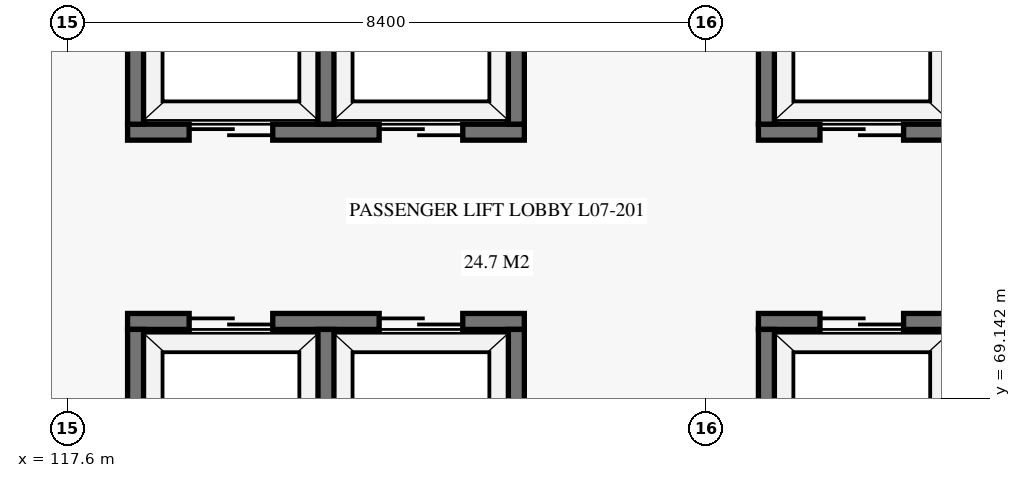
"""IFC4 building model, lengths in metres.
Left out: names, types, materials, properties, quantities, classifications, styles, units other than length and angle.
Written with IfcOpenShell. Run it as: python <this file> out.ifc"""

import sys

from ifc_helpers import new_model, si_unit, direction, frame, frame_2d, origin, place, context, subcontext, project, spatial, rectangle, extrude, element, fill, save


model = new_model("IFC4")
c1 = context("Model", 3, precision=1e-05, world=origin(), true_north=direction((0.0, 1.0)))
c2 = subcontext(c1, "Body", "Model", "MODEL_VIEW")
j1 = project(units=[si_unit("LENGTHUNIT", "METRE"), si_unit("PLANEANGLEUNIT", "RADIAN")], contexts=[c1])
p1 = place(None, origin())
s1 = spatial("IfcSite", under=j1, at=p1, CompositionType="ELEMENT")
p2 = place(p1, origin())
s2 = spatial("IfcBuilding", under=s1, at=p2, CompositionType="ELEMENT")
p3 = place(p2, frame((0.0, 0.0, 30.7)))
s3 = spatial("IfcBuildingStorey", under=s2, at=p3, CompositionType="ELEMENT", Elevation=30.7)
p4 = place(p3, frame((126.69, 70.155, 0.0), z_axis=(0.0, 0.0, 1.0), x_axis=(1.0, 0.0, 0.0)))
e1 = element("IfcWall", 1, at=p4, inside=s3, PredefinedType="SHEAR", context=c2, shape_type="SweptSolid", body=[
    extrude(rectangle(XDim=5.22, YDim=0.21, at=frame_2d((2.61, 0.0))), origin(), (0.0, 0.0, 1.0), 3.72),
])
p5 = place(p4, frame((0.81, 0.0, 0.0)))
e2 = element("IfcOpeningElement", 2, at=p5, cuts=e1, PredefinedType="OPENING", context=c2, shape_type="SweptSolid", body=[
    extrude(rectangle(XDim=1.1, YDim=2.15, at=frame_2d((0.55, 1.075))), frame((0.0, 0.115, 0.0), z_axis=(0.0, -1.0, 0.0), x_axis=(1.0, 0.0, 0.0)), (0.0, 0.0, 1.0), 0.23),
])
p6 = place(p4, frame((3.31, 0.0, 0.0)))
e3 = element("IfcOpeningElement", 3, at=p6, cuts=e1, PredefinedType="OPENING", context=c2, shape_type="SweptSolid", body=[
    extrude(rectangle(XDim=1.1, YDim=2.15, at=frame_2d((0.55, 1.075))), frame((0.0, 0.115, 0.0), z_axis=(0.0, -1.0, 0.0), x_axis=(1.0, 0.0, 0.0)), (0.0, 0.0, 1.0), 0.23),
])
p7 = place(p3, frame((126.795, 67.85, 0.0), z_axis=(0.0, 0.0, 1.0), x_axis=(0.0, 1.0, 0.0)))
e4 = element("IfcWall", 4, at=p7, inside=s3, PredefinedType="SHEAR", context=c2, shape_type="SweptSolid", body=[
    extrude(rectangle(XDim=2.2, YDim=0.21, at=frame_2d((1.1, 0.0))), origin(), (0.0, 0.0, 1.0), 3.72),
])
p8 = place(p3, frame((126.69, 72.645, 0.0), z_axis=(0.0, 0.0, 1.0), x_axis=(1.0, 0.0, 0.0)))
e5 = element("IfcWall", 5, at=p8, inside=s3, PredefinedType="SHEAR", context=c2, shape_type="SweptSolid", body=[
    extrude(rectangle(XDim=5.22, YDim=0.21, at=frame_2d((2.61, 0.0))), origin(), (0.0, 0.0, 1.0), 3.72),
])
p9 = place(p8, frame((0.81, 0.0, 0.0)))
e6 = element("IfcOpeningElement", 6, at=p9, cuts=e5, PredefinedType="OPENING", context=c2, shape_type="SweptSolid", body=[
    extrude(rectangle(XDim=1.1, YDim=2.15, at=frame_2d((0.55, 1.075))), frame((0.0, 0.115, 0.0), z_axis=(0.0, -1.0, 0.0), x_axis=(1.0, 0.0, 0.0)), (0.0, 0.0, 1.0), 0.23),
])
p10 = place(p8, frame((3.31, 0.0, 0.0)))
e7 = element("IfcOpeningElement", 7, at=p10, cuts=e5, PredefinedType="OPENING", context=c2, shape_type="SweptSolid", body=[
    extrude(rectangle(XDim=1.1, YDim=2.15, at=frame_2d((0.55, 1.075))), frame((0.0, 0.115, 0.0), z_axis=(0.0, -1.0, 0.0), x_axis=(1.0, 0.0, 0.0)), (0.0, 0.0, 1.0), 0.23),
])
p11 = place(p3, frame((126.795, 72.75, 0.0), z_axis=(0.0, 0.0, 1.0), x_axis=(0.0, 1.0, 0.0)))
e8 = element("IfcWall", 8, at=p11, inside=s3, PredefinedType="SHEAR", context=c2, shape_type="SweptSolid", body=[
    extrude(rectangle(XDim=2.2, YDim=0.21, at=frame_2d((1.1, 0.0))), origin(), (0.0, 0.0, 1.0), 3.72),
])
p12 = place(p3, frame((118.39, 70.155, 0.0), z_axis=(0.0, 0.0, 1.0), x_axis=(1.0, 0.0, 0.0)))
e9 = element("IfcWall", 9, at=p12, inside=s3, PredefinedType="SHEAR", context=c2, shape_type="SweptSolid", body=[
    extrude(rectangle(XDim=5.22, YDim=0.21, at=frame_2d((2.61, 0.0))), origin(), (0.0, 0.0, 1.0), 3.72),
])
p13 = place(p12, frame((0.81, 0.0, 0.0)))
e10 = element("IfcOpeningElement", 10, at=p13, cuts=e9, PredefinedType="OPENING", context=c2, shape_type="SweptSolid", body=[
    extrude(rectangle(XDim=1.1, YDim=2.15, at=frame_2d((0.55, 1.075))), frame((0.0, 0.115, 0.0), z_axis=(0.0, -1.0, 0.0), x_axis=(1.0, 0.0, 0.0)), (0.0, 0.0, 1.0), 0.23),
])
p14 = place(p12, frame((3.31, 0.0, 0.0)))
e11 = element("IfcOpeningElement", 11, at=p14, cuts=e9, PredefinedType="OPENING", context=c2, shape_type="SweptSolid", body=[
    extrude(rectangle(XDim=1.1, YDim=2.15, at=frame_2d((0.55, 1.075))), frame((0.0, 0.115, 0.0), z_axis=(0.0, -1.0, 0.0), x_axis=(1.0, 0.0, 0.0)), (0.0, 0.0, 1.0), 0.23),
])
for number, where, z_axis, x_axis in (
    (12, (118.495, 67.85, 0.0), (0.0, 0.0, 1.0), (0.0, 1.0, 0.0)),
    (13, (123.505, 67.85, 0.0), (0.0, 0.0, 1.0), (0.0, 1.0, 0.0)),
    (14, (121.0, 67.85, 0.0), (0.0, 0.0, 1.0), (0.0, 1.0, 0.0)),
):
    element("IfcWall", number, at=place(p3, frame(where, z_axis=z_axis, x_axis=x_axis)), inside=s3, PredefinedType="SHEAR", context=c2, shape_type="SweptSolid", body=[
        extrude(rectangle(XDim=2.2, YDim=0.21, at=frame_2d((1.1, 0.0))), origin(), (0.0, 0.0, 1.0), 3.72),
    ])
p15 = place(p3, frame((118.39, 72.645, 0.0), z_axis=(0.0, 0.0, 1.0), x_axis=(1.0, 0.0, 0.0)))
e15 = element("IfcWall", 15, at=p15, inside=s3, PredefinedType="SHEAR", context=c2, shape_type="SweptSolid", body=[
    extrude(rectangle(XDim=5.22, YDim=0.21, at=frame_2d((2.61, 0.0))), origin(), (0.0, 0.0, 1.0), 3.72),
])
p16 = place(p15, frame((0.81, 0.0, 0.0)))
e16 = element("IfcOpeningElement", 16, at=p16, cuts=e15, PredefinedType="OPENING", context=c2, shape_type="SweptSolid", body=[
    extrude(rectangle(XDim=1.1, YDim=2.15, at=frame_2d((0.55, 1.075))), frame((0.0, 0.115, 0.0), z_axis=(0.0, -1.0, 0.0), x_axis=(1.0, 0.0, 0.0)), (0.0, 0.0, 1.0), 0.23),
])
p17 = place(p15, frame((3.31, 0.0, 0.0)))
e17 = element("IfcOpeningElement", 17, at=p17, cuts=e15, PredefinedType="OPENING", context=c2, shape_type="SweptSolid", body=[
    extrude(rectangle(XDim=1.1, YDim=2.15, at=frame_2d((0.55, 1.075))), frame((0.0, 0.115, 0.0), z_axis=(0.0, -1.0, 0.0), x_axis=(1.0, 0.0, 0.0)), (0.0, 0.0, 1.0), 0.23),
])
for number, where, z_axis, x_axis in (
    (18, (118.495, 72.75, 0.0), (0.0, 0.0, 1.0), (0.0, 1.0, 0.0)),
    (19, (123.505, 72.75, 0.0), (0.0, 0.0, 1.0), (0.0, 1.0, 0.0)),
    (20, (121.0, 72.75, 0.0), (0.0, 0.0, 1.0), (0.0, 1.0, 0.0)),
):
    element("IfcWall", number, at=place(p3, frame(where, z_axis=z_axis, x_axis=x_axis)), inside=s3, PredefinedType="SHEAR", context=c2, shape_type="SweptSolid", body=[
        extrude(rectangle(XDim=2.2, YDim=0.21, at=frame_2d((1.1, 0.0))), origin(), (0.0, 0.0, 1.0), 3.72),
    ])
p18 = place(p5, origin())
e21 = element("IfcDoor", 21, at=p18, inside=s3, OperationType="DOUBLE_DOOR_SLIDING", PredefinedType="DOOR", context=c2, shape_type="SweptSolid", body=[
    extrude(rectangle(XDim=1.1, YDim=2.15, at=frame_2d((0.55, 1.075))), frame((0.0, 0.025, 0.0), z_axis=(0.0, -1.0, 0.0), x_axis=(1.0, 0.0, 0.0)), (0.0, 0.0, 1.0), 0.05),
])
fill(e2, e21)
p19 = place(p9, origin())
e22 = element("IfcDoor", 22, at=p19, inside=s3, OperationType="DOUBLE_DOOR_SLIDING", PredefinedType="DOOR", context=c2, shape_type="SweptSolid", body=[
    extrude(rectangle(XDim=1.1, YDim=2.15, at=frame_2d((0.55, 1.075))), frame((0.0, 0.025, 0.0), z_axis=(0.0, -1.0, 0.0), x_axis=(1.0, 0.0, 0.0)), (0.0, 0.0, 1.0), 0.05),
])
fill(e6, e22)
p20 = place(p13, origin())
e23 = element("IfcDoor", 23, at=p20, inside=s3, OperationType="DOUBLE_DOOR_SLIDING", PredefinedType="DOOR", context=c2, shape_type="SweptSolid", body=[
    extrude(rectangle(XDim=1.1, YDim=2.15, at=frame_2d((0.55, 1.075))), frame((0.0, 0.025, 0.0), z_axis=(0.0, -1.0, 0.0), x_axis=(1.0, 0.0, 0.0)), (0.0, 0.0, 1.0), 0.05),
])
fill(e10, e23)
p21 = place(p14, origin())
e24 = element("IfcDoor", 24, at=p21, inside=s3, OperationType="DOUBLE_DOOR_SLIDING", PredefinedType="DOOR", context=c2, shape_type="SweptSolid", body=[
    extrude(rectangle(XDim=1.1, YDim=2.15, at=frame_2d((0.55, 1.075))), frame((0.0, 0.025, 0.0), z_axis=(0.0, -1.0, 0.0), x_axis=(1.0, 0.0, 0.0)), (0.0, 0.0, 1.0), 0.05),
])
fill(e11, e24)
p22 = place(p16, origin())
e25 = element("IfcDoor", 25, at=p22, inside=s3, OperationType="DOUBLE_DOOR_SLIDING", PredefinedType="DOOR", context=c2, shape_type="SweptSolid", body=[
    extrude(rectangle(XDim=1.1, YDim=2.15, at=frame_2d((0.55, 1.075))), frame((0.0, 0.025, 0.0), z_axis=(0.0, -1.0, 0.0), x_axis=(1.0, 0.0, 0.0)), (0.0, 0.0, 1.0), 0.05),
])
fill(e16, e25)
p23 = place(p17, origin())
e26 = element("IfcDoor", 26, at=p23, inside=s3, OperationType="DOUBLE_DOOR_SLIDING", PredefinedType="DOOR", context=c2, shape_type="SweptSolid", body=[
    extrude(rectangle(XDim=1.1, YDim=2.15, at=frame_2d((0.55, 1.075))), frame((0.0, 0.025, 0.0), z_axis=(0.0, -1.0, 0.0), x_axis=(1.0, 0.0, 0.0)), (0.0, 0.0, 1.0), 0.05),
])
fill(e17, e26)
save(model, sys.argv[1])
